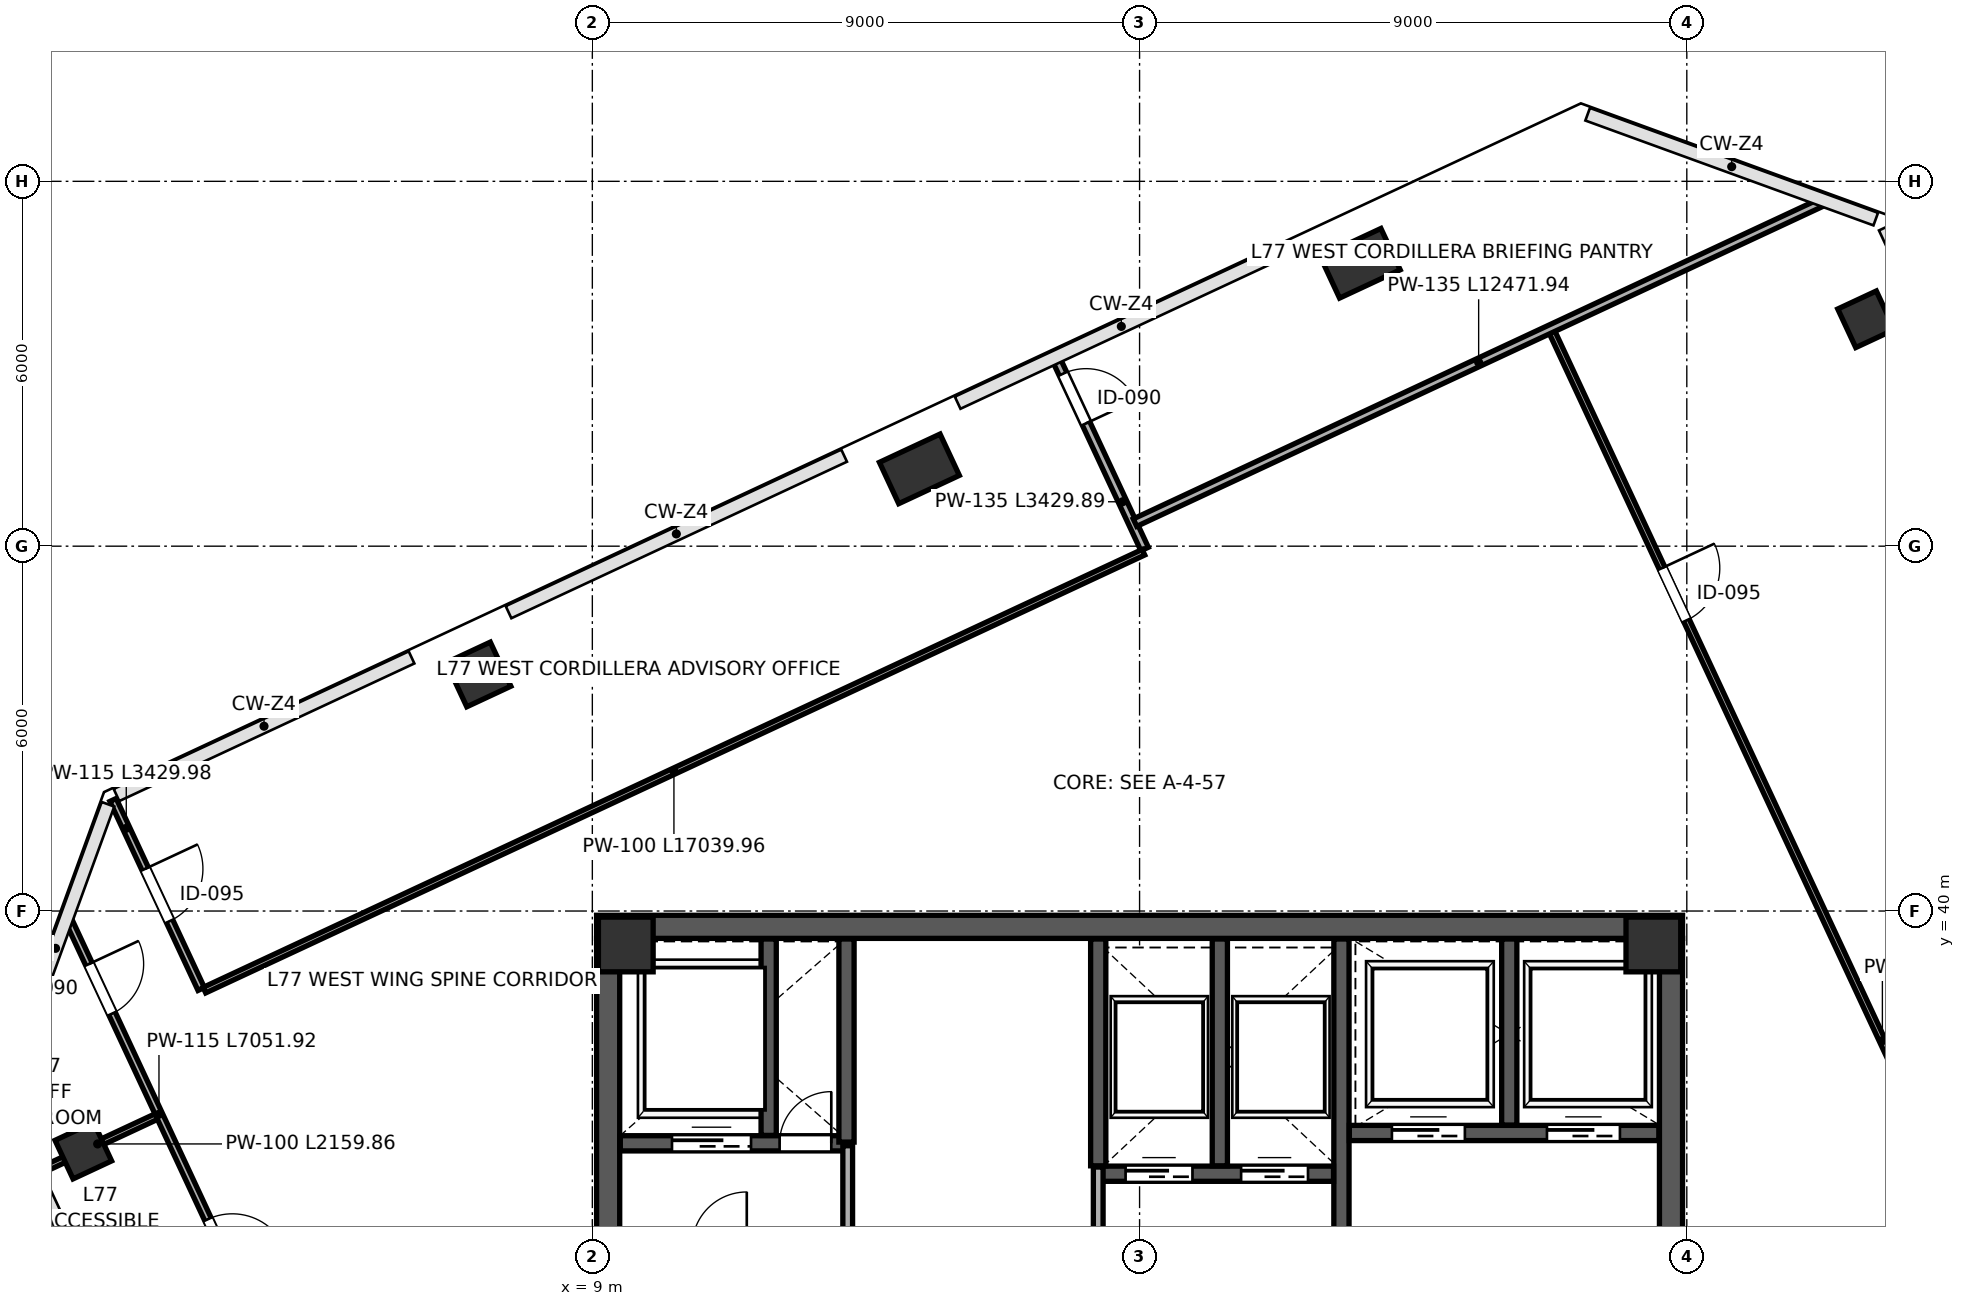
"""IFC4 building model, lengths in metres.
Left out: names, types, materials, properties, quantities, classifications, styles, units other than length and angle.
Written with IfcOpenShell. Run it as: python <this file> out.ifc"""

import sys

from ifc_helpers import new_model, si_unit, direction, frame, frame_2d, origin, origin_2d, place, context, subcontext, project, spatial, rectangle, extrude, source, transform, mapped, element, fill, save


model = new_model("IFC4")
c1 = context("Model", 3, precision=1e-05, world=origin(), true_north=direction((0.0, 1.0)))
c2 = subcontext(c1, "Body", "Model", "MODEL_VIEW")
j1 = project(units=[si_unit("LENGTHUNIT", "METRE"), si_unit("PLANEANGLEUNIT", "RADIAN")], contexts=[c1])
p1 = place(None, origin())
s1 = spatial("IfcSite", under=j1, at=p1, CompositionType="ELEMENT")
p2 = place(p1, origin())
s2 = spatial("IfcBuilding", under=s1, at=p2, CompositionType="ELEMENT")
p3 = place(p2, frame((0.0, 0.0, 340.8)))
s3 = spatial("IfcBuildingStorey", under=s2, at=p3, CompositionType="ELEMENT", Elevation=340.8)
m1 = source(origin(), c2, "Body", "SweptSolid", [
    extrude(rectangle(XDim=0.9, YDim=0.9, at=origin_2d()), origin(), (0.0, 0.0, 1.0), 4.198),
])
for number, where, z_axis, x_axis in (
    (1, (9.55, 39.45, 0.001), (0.0, 0.0, 1.0), (1.0, 0.0, 0.0)),
    (2, (26.45, 39.45, 0.001), (0.0, 0.0, 1.0), (1.0, 0.0, 0.0)),
):
    element("IfcColumn", number, at=place(p3, frame(where, z_axis=z_axis, x_axis=x_axis)), inside=s3, PredefinedType="COLUMN", context=c2, shape_type="MappedRepresentation", body=[
        mapped(m1, transform((0.0, 0.0, 0.0), scale=1.0)),
    ])
m2 = source(origin(), c2, "Body", "SweptSolid", [
    extrude(rectangle(XDim=0.7, YDim=0.7, at=origin_2d()), origin(), (0.0, 0.0, 1.0), 4.198),
])
for number, where, z_axis, x_axis in (
    (3, (0.629, 36.06, 0.001), (0.0, 0.0, 1.0), (-0.423, 0.906, 0.0)),
    (4, (29.948, 49.731, 0.001), (0.0, 0.0, 1.0), (-0.423, 0.906, 0.0)),
):
    element("IfcColumn", number, at=place(p3, frame(where, z_axis=z_axis, x_axis=x_axis)), inside=s3, PredefinedType="COLUMN", context=c2, shape_type="MappedRepresentation", body=[
        mapped(m2, transform((0.0, 0.0, 0.0), scale=1.0)),
    ])
m3 = source(origin(), c2, "Body", "SweptSolid", [
    extrude(rectangle(XDim=0.8, YDim=0.8, at=origin_2d()), origin(), (0.0, 0.0, 1.0), 4.198),
])
p4 = place(p3, frame((7.128, 43.89, 0.001), z_axis=(0.0, 0.0, 1.0), x_axis=(-0.422618261741, 0.906307787037, 0.0)))
e5 = element("IfcColumn", 5, at=p4, inside=s3, PredefinedType="COLUMN", context=c2, shape_type="MappedRepresentation", body=[
    mapped(m3, transform((0.0, 0.0, 0.0), scale=1.0)),
])
m4 = source(origin(), c2, "Body", "SweptSolid", [
    extrude(rectangle(XDim=0.75, YDim=1.1, at=origin_2d()), origin(), (0.0, 0.0, 1.0), 4.198),
])
for number, where, z_axis, x_axis in (
    (6, (14.379, 47.271, 0.001), (0.0, 0.0, 1.0), (-0.423, 0.906, 0.0)),
    (7, (21.629, 50.652, 0.001), (0.0, 0.0, 1.0), (-0.423, 0.906, 0.0)),
):
    element("IfcColumn", number, at=place(p3, frame(where, z_axis=z_axis, x_axis=x_axis)), inside=s3, PredefinedType="PILASTER", context=c2, shape_type="MappedRepresentation", body=[
        mapped(m4, transform((0.0, 0.0, 0.0), scale=1.0)),
    ])
p5 = place(p3, frame((9.26, 24.45, 0.0), z_axis=(0.0, 0.0, 1.0), x_axis=(0.0, 1.0, 0.0)))
e8 = element("IfcWall", 8, at=p5, inside=s3, PredefinedType="SHEAR", context=c2, shape_type="SweptSolid", body=[
    extrude(rectangle(XDim=15.1, YDim=0.38, at=frame_2d((7.55, 0.0))), origin(), (0.0, 0.0, 1.0), 3.96),
])
p6 = place(p5, frame((8.7, 0.0, 0.0)))
e9 = element("IfcOpeningElement", 9, at=p6, cuts=e8, PredefinedType="OPENING", context=c2, shape_type="SweptSolid", body=[
    extrude(rectangle(XDim=1.15, YDim=2.2, at=frame_2d((0.575, 1.1))), frame((0.0, 0.2, 0.0), z_axis=(0.0, -1.0, 0.0), x_axis=(1.0, 0.0, 0.0)), (0.0, 0.0, 1.0), 0.4),
])
p7 = place(p3, frame((26.74, 24.45, 0.0), z_axis=(0.0, 0.0, 1.0), x_axis=(0.0, 1.0, 0.0)))
e10 = element("IfcWall", 10, at=p7, inside=s3, PredefinedType="SHEAR", context=c2, shape_type="SweptSolid", body=[
    extrude(rectangle(XDim=15.1, YDim=0.38, at=frame_2d((7.55, 0.0))), origin(), (0.0, 0.0, 1.0), 3.96),
])
p8 = place(p7, frame((8.6, 0.0, 0.0)))
e11 = element("IfcOpeningElement", 11, at=p8, cuts=e10, PredefinedType="OPENING", context=c2, shape_type="SweptSolid", body=[
    extrude(rectangle(XDim=1.15, YDim=2.2, at=frame_2d((0.575, 1.1))), frame((0.0, 0.2, 0.0), z_axis=(0.0, -1.0, 0.0), x_axis=(1.0, 0.0, 0.0)), (0.0, 0.0, 1.0), 0.4),
])
p9 = place(p3, frame((9.07, 39.74, 0.0), z_axis=(0.0, 0.0, 1.0), x_axis=(1.0, 0.0, 0.0)))
e12 = element("IfcWall", 12, at=p9, inside=s3, PredefinedType="SHEAR", context=c2, shape_type="SweptSolid", body=[
    extrude(rectangle(XDim=17.86, YDim=0.38, at=frame_2d((8.93, 0.0))), origin(), (0.0, 0.0, 1.0), 3.96),
])
p10 = place(p3, frame((21.32, 32.12, 0.0), z_axis=(0.0, 0.0, 1.0), x_axis=(0.0, 1.0, 0.0)))
e13 = element("IfcWall", 13, at=p10, inside=s3, PredefinedType="SHEAR", context=c2, shape_type="SweptSolid", body=[
    extrude(rectangle(XDim=7.42, YDim=0.25, at=frame_2d((3.71, 0.0))), origin(), (0.0, 0.0, 1.0), 3.96),
])
p11 = place(p10, frame((1.4, 0.0, 0.0)))
e14 = element("IfcOpeningElement", 14, at=p11, cuts=e13, PredefinedType="OPENING", context=c2, shape_type="SweptSolid", body=[
    extrude(rectangle(XDim=1.15, YDim=2.2, at=frame_2d((0.575, 1.1))), frame((0.0, 0.135, 0.0), z_axis=(0.0, -1.0, 0.0), x_axis=(1.0, 0.0, 0.0)), (0.0, 0.0, 1.0), 0.27),
])
p12 = place(p3, frame((9.46, 36.18, 0.0), z_axis=(0.0, 0.0, 1.0), x_axis=(1.0, 0.0, 0.0)))
e15 = element("IfcWall", 15, at=p12, inside=s3, PredefinedType="SHEAR", context=c2, shape_type="SweptSolid", body=[
    extrude(rectangle(XDim=3.79, YDim=0.25, at=frame_2d((1.895, 0.0))), origin(), (0.0, 0.0, 1.0), 3.96),
])
p13 = place(p12, frame((2.62, 0.0, 0.0)))
e16 = element("IfcOpeningElement", 16, at=p13, cuts=e15, PredefinedType="OPENING", context=c2, shape_type="SweptSolid", body=[
    extrude(rectangle(XDim=0.85, YDim=2.1, at=frame_2d((0.425, 1.05))), frame((0.0, 0.135, 0.0), z_axis=(0.0, -1.0, 0.0), x_axis=(1.0, 0.0, 0.0)), (0.0, 0.0, 1.0), 0.27),
])
p14 = place(p12, frame((0.85, 0.0, 0.0)))
e17 = element("IfcOpeningElement", 17, at=p14, cuts=e15, PredefinedType="OPENING", context=c2, shape_type="SweptSolid", body=[
    extrude(rectangle(XDim=1.3, YDim=2.25, at=frame_2d((0.65, 1.125))), frame((0.0, 0.135, 0.0), z_axis=(0.0, -1.0, 0.0), x_axis=(1.0, 0.0, 0.0)), (0.0, 0.0, 1.0), 0.27),
])
p15 = place(p3, frame((11.9, 36.31, 0.0), z_axis=(0.0, 0.0, 1.0), x_axis=(0.0, 1.0, 0.0)))
e18 = element("IfcWall", 18, at=p15, inside=s3, PredefinedType="SHEAR", context=c2, shape_type="SweptSolid", body=[
    extrude(rectangle(XDim=3.23, YDim=0.25, at=frame_2d((1.615, 0.0))), origin(), (0.0, 0.0, 1.0), 3.96),
])
p16 = place(p3, frame((21.45, 36.35, 0.0), z_axis=(0.0, 0.0, 1.0), x_axis=(1.0, 0.0, 0.0)))
e19 = element("IfcWall", 19, at=p16, inside=s3, PredefinedType="SHEAR", context=c2, shape_type="SweptSolid", body=[
    extrude(rectangle(XDim=5.09, YDim=0.25, at=frame_2d((2.545, 0.0))), origin(), (0.0, 0.0, 1.0), 3.96),
])
p17 = place(p16, frame((0.7, 0.0, 0.0)))
e20 = element("IfcOpeningElement", 20, at=p17, cuts=e19, PredefinedType="OPENING", context=c2, shape_type="SweptSolid", body=[
    extrude(rectangle(XDim=1.2, YDim=2.2, at=frame_2d((0.6, 1.1))), frame((0.0, 0.135, 0.0), z_axis=(0.0, -1.0, 0.0), x_axis=(1.0, 0.0, 0.0)), (0.0, 0.0, 1.0), 0.27),
])
p18 = place(p16, frame((3.25, 0.0, 0.0)))
e21 = element("IfcOpeningElement", 21, at=p18, cuts=e19, PredefinedType="OPENING", context=c2, shape_type="SweptSolid", body=[
    extrude(rectangle(XDim=1.2, YDim=2.2, at=frame_2d((0.6, 1.1))), frame((0.0, 0.135, 0.0), z_axis=(0.0, -1.0, 0.0), x_axis=(1.0, 0.0, 0.0)), (0.0, 0.0, 1.0), 0.27),
])
p19 = place(p3, frame((24.08, 36.48, 0.0), z_axis=(0.0, 0.0, 1.0), x_axis=(0.0, 1.0, 0.0)))
e22 = element("IfcWall", 22, at=p19, inside=s3, PredefinedType="SHEAR", context=c2, shape_type="SweptSolid", body=[
    extrude(rectangle(XDim=3.06, YDim=0.25, at=frame_2d((1.53, 0.0))), origin(), (0.0, 0.0, 1.0), 3.96),
])
p20 = place(p3, frame((13.18, 36.2, 0.0), z_axis=(0.0, 0.0, 1.0), x_axis=(0.0, 1.0, 0.0)))
e23 = element("IfcWall", 23, at=p20, inside=s3, PredefinedType="SHEAR", context=c2, shape_type="SweptSolid", body=[
    extrude(rectangle(XDim=3.34, YDim=0.25, at=frame_2d((1.67, 0.0))), origin(), (0.0, 0.0, 1.0), 3.96),
])
p21 = place(p3, frame((17.32, 35.68, 0.0), z_axis=(0.0, 0.0, 1.0), x_axis=(1.0, 0.0, 0.0)))
e24 = element("IfcWall", 24, at=p21, inside=s3, PredefinedType="SHEAR", context=c2, shape_type="SweptSolid", body=[
    extrude(rectangle(XDim=3.87, YDim=0.25, at=frame_2d((1.935, 0.0))), origin(), (0.0, 0.0, 1.0), 3.96),
])
p22 = place(p21, frame((0.45, 0.0, 0.0)))
e25 = element("IfcOpeningElement", 25, at=p22, cuts=e24, PredefinedType="OPENING", context=c2, shape_type="SweptSolid", body=[
    extrude(rectangle(XDim=1.1, YDim=2.2, at=frame_2d((0.55, 1.1))), frame((0.0, 0.135, 0.0), z_axis=(0.0, -1.0, 0.0), x_axis=(1.0, 0.0, 0.0)), (0.0, 0.0, 1.0), 0.27),
])
p23 = place(p21, frame((2.35, 0.0, 0.0)))
e26 = element("IfcOpeningElement", 26, at=p23, cuts=e24, PredefinedType="OPENING", context=c2, shape_type="SweptSolid", body=[
    extrude(rectangle(XDim=1.1, YDim=2.2, at=frame_2d((0.55, 1.1))), frame((0.0, 0.135, 0.0), z_axis=(0.0, -1.0, 0.0), x_axis=(1.0, 0.0, 0.0)), (0.0, 0.0, 1.0), 0.27),
])
for number, where, z_axis, x_axis in (
    (27, (17.32, 35.81, 0.0), (0.0, 0.0, 1.0), (0.0, 1.0, 0.0)),
    (28, (19.32, 35.81, 0.0), (0.0, 0.0, 1.0), (0.0, 1.0, 0.0)),
):
    element("IfcWall", number, at=place(p3, frame(where, z_axis=z_axis, x_axis=x_axis)), inside=s3, PredefinedType="SHEAR", context=c2, shape_type="SweptSolid", body=[
        extrude(rectangle(XDim=3.73, YDim=0.25, at=frame_2d((1.865, 0.0))), origin(), (0.0, 0.0, 1.0), 3.96),
    ])
p24 = place(p3, frame((13.2, 34.57, 0.0), z_axis=(0.0, 0.0, 1.0), x_axis=(0.0, 1.0, 0.0)))
e29 = element("IfcWall", 29, at=p24, inside=s3, PredefinedType="PARTITIONING", context=c2, shape_type="SweptSolid", body=[
    extrude(rectangle(XDim=1.57, YDim=0.16, at=frame_2d((0.785, 0.0))), origin(), (0.0, 0.0, 1.0), 3.96),
])
p25 = place(p3, frame((17.32, 33.86, 0.0), z_axis=(0.0, 0.0, 1.0), x_axis=(0.0, 1.0, 0.0)))
e30 = element("IfcWall", 30, at=p25, inside=s3, PredefinedType="PARTITIONING", context=c2, shape_type="SweptSolid", body=[
    extrude(rectangle(XDim=1.93, YDim=0.16, at=frame_2d((0.965, 0.0))), origin(), (0.0, 0.0, 1.0), 3.96),
])
p26 = place(p3, frame((-0.114, 35.713, 0.0), z_axis=(0.0, 0.0, 1.0), x_axis=(0.906301500739, 0.422631742487, 0.0)))
e31 = element("IfcWall", 31, at=p26, inside=s3, PredefinedType="PARTITIONING", context=c2, shape_type="SweptSolid", body=[
    extrude(rectangle(XDim=2.16, YDim=0.1, at=frame_2d((1.08, 0.0))), origin(), (0.0, 0.0, 1.0), 3.295),
])
p27 = place(p3, frame((0.383, 39.853, 0.0), z_axis=(0.0, 0.0, 1.0), x_axis=(0.422618208415, -0.906307811903, 0.0)))
e32 = element("IfcWall", 32, at=p27, inside=s3, PredefinedType="PARTITIONING", context=c2, shape_type="SweptSolid", body=[
    extrude(rectangle(XDim=7.052, YDim=0.115, at=frame_2d((3.526, 0.0))), origin(), (0.0, 0.0, 1.0), 3.96),
])
p28 = place(p27, frame((0.8, 0.0, 0.0)))
e33 = element("IfcOpeningElement", 33, at=p28, cuts=e32, PredefinedType="OPENING", context=c2, shape_type="SweptSolid", body=[
    extrude(rectangle(XDim=0.9, YDim=2.15, at=frame_2d((0.45, 1.075))), frame((0.0, 0.067, 0.0), z_axis=(0.0, -1.0, 0.0), x_axis=(1.0, 0.0, 0.0)), (0.0, 0.0, 1.0), 0.135),
])
p29 = place(p27, frame((5.43, 0.0, 0.0)))
e34 = element("IfcOpeningElement", 34, at=p29, cuts=e32, PredefinedType="OPENING", context=c2, shape_type="SweptSolid", body=[
    extrude(rectangle(XDim=0.95, YDim=2.15, at=frame_2d((0.475, 1.075))), frame((0.0, 0.067, 0.0), z_axis=(0.0, -1.0, 0.0), x_axis=(1.0, 0.0, 0.0)), (0.0, 0.0, 1.0), 0.135),
])
p30 = place(p3, frame((24.775, 49.537, 0.0), z_axis=(0.0, 0.0, 1.0), x_axis=(0.422615543458, -0.906309054588, 0.0)))
e35 = element("IfcWall", 35, at=p30, inside=s3, PredefinedType="PARTITIONING", context=c2, shape_type="SweptSolid", body=[
    extrude(rectangle(XDim=25.75, YDim=0.1, at=frame_2d((12.875, 0.0))), origin(), (0.0, 0.0, 1.0), 3.96),
])
p31 = place(p30, frame((4.3, 0.0, 0.0)))
e36 = element("IfcOpeningElement", 36, at=p31, cuts=e35, PredefinedType="OPENING", context=c2, shape_type="SweptSolid", body=[
    extrude(rectangle(XDim=0.95, YDim=2.15, at=frame_2d((0.475, 1.075))), frame((0.0, 0.06, 0.0), z_axis=(0.0, -1.0, 0.0), x_axis=(1.0, 0.0, 0.0)), (0.0, 0.0, 1.0), 0.12),
])
p32 = place(p3, frame((16.633, 49.062, 0.0), z_axis=(0.0, 0.0, 1.0), x_axis=(0.422675027226, -0.906281314692, 0.0)))
e37 = element("IfcWall", 37, at=p32, inside=s3, PredefinedType="PARTITIONING", context=c2, shape_type="SweptSolid", body=[
    extrude(rectangle(XDim=3.43, YDim=0.135, at=frame_2d((1.715, 0.0))), origin(), (0.0, 0.0, 1.0), 3.295),
])
p33 = place(p32, frame((0.25, 0.0, 0.0)))
e38 = element("IfcOpeningElement", 38, at=p33, cuts=e37, PredefinedType="OPENING", context=c2, shape_type="SweptSolid", body=[
    extrude(rectangle(XDim=0.9, YDim=2.15, at=frame_2d((0.45, 1.075))), frame((0.0, 0.078, 0.0), z_axis=(0.0, -1.0, 0.0), x_axis=(1.0, 0.0, 0.0)), (0.0, 0.0, 1.0), 0.155),
])
p34 = place(p3, frame((1.117, 41.827, 0.0), z_axis=(0.0, 0.0, 1.0), x_axis=(0.422589296843, -0.906321293027, 0.0)))
e39 = element("IfcWall", 39, at=p34, inside=s3, PredefinedType="PARTITIONING", context=c2, shape_type="SweptSolid", body=[
    extrude(rectangle(XDim=3.43, YDim=0.115, at=frame_2d((1.715, 0.0))), origin(), (0.0, 0.0, 1.0), 3.96),
])
p35 = place(p34, frame((1.25, 0.0, 0.0)))
e40 = element("IfcOpeningElement", 40, at=p35, cuts=e39, PredefinedType="OPENING", context=c2, shape_type="SweptSolid", body=[
    extrude(rectangle(XDim=0.95, YDim=2.15, at=frame_2d((0.475, 1.075))), frame((0.0, 0.067, 0.0), z_axis=(0.0, -1.0, 0.0), x_axis=(1.0, 0.0, 0.0)), (0.0, 0.0, 1.0), 0.135),
])
p36 = place(p3, frame((2.62, 38.698, 0.0), z_axis=(0.0, 0.0, 1.0), x_axis=(0.90630352598, 0.422627399487, 0.0)))
e41 = element("IfcWall", 41, at=p36, inside=s3, PredefinedType="PARTITIONING", context=c2, shape_type="SweptSolid", body=[
    extrude(rectangle(XDim=17.04, YDim=0.1, at=frame_2d((8.52, 0.0))), origin(), (0.0, 0.0, 1.0), 3.96),
])
p37 = place(p3, frame((17.925, 46.387, 0.0), z_axis=(0.0, 0.0, 1.0), x_axis=(0.906304624979, 0.422625042729, 0.0)))
e42 = element("IfcWall", 42, at=p37, inside=s3, PredefinedType="PARTITIONING", context=c2, shape_type="SweptSolid", body=[
    extrude(rectangle(XDim=12.472, YDim=0.135, at=frame_2d((6.236, 0.0))), origin(), (0.0, 0.0, 1.0), 3.96),
])
m5 = source(origin(), c2, "Body", "SweptSolid", [
    extrude(rectangle(XDim=0.85, YDim=2.1, at=frame_2d((0.425, 1.05))), frame((0.0, 0.025, 0.0), z_axis=(0.0, -1.0, 0.0), x_axis=(1.0, 0.0, 0.0)), (0.0, 0.0, 1.0), 0.05),
])
p38 = place(p13, origin())
e43 = element("IfcDoor", 43, at=p38, inside=s3, OperationType="SINGLE_SWING_RIGHT", PredefinedType="DOOR", context=c2, shape_type="MappedRepresentation", body=[
    mapped(m5, transform((0.0, 0.0, 0.0), scale=1.0)),
])
fill(e16, e43)
m6 = source(origin(), c2, "Body", "SweptSolid", [
    extrude(rectangle(XDim=1.1, YDim=2.2, at=frame_2d((0.55, 1.1))), frame((0.0, 0.025, 0.0), z_axis=(0.0, -1.0, 0.0), x_axis=(1.0, 0.0, 0.0)), (0.0, 0.0, 1.0), 0.05),
])
p39 = place(p22, origin())
e44 = element("IfcDoor", 44, at=p39, inside=s3, OperationType="SLIDING_TO_LEFT", PredefinedType="DOOR", context=c2, shape_type="MappedRepresentation", body=[
    mapped(m6, transform((0.0, 0.0, 0.0), scale=1.0)),
])
fill(e25, e44)
p40 = place(p23, origin())
e45 = element("IfcDoor", 45, at=p40, inside=s3, OperationType="SLIDING_TO_RIGHT", PredefinedType="DOOR", context=c2, shape_type="MappedRepresentation", body=[
    mapped(m6, transform((0.0, 0.0, 0.0), scale=1.0)),
])
fill(e26, e45)
m7 = source(origin(), c2, "Body", "SweptSolid", [
    extrude(rectangle(XDim=1.2, YDim=2.2, at=frame_2d((0.6, 1.1))), frame((0.0, 0.025, 0.0), z_axis=(0.0, -1.0, 0.0), x_axis=(1.0, 0.0, 0.0)), (0.0, 0.0, 1.0), 0.05),
])
p41 = place(p17, origin())
e46 = element("IfcDoor", 46, at=p41, inside=s3, OperationType="SLIDING_TO_LEFT", PredefinedType="DOOR", context=c2, shape_type="MappedRepresentation", body=[
    mapped(m7, transform((0.0, 0.0, 0.0), scale=1.0)),
])
fill(e20, e46)
p42 = place(p18, origin())
e47 = element("IfcDoor", 47, at=p42, inside=s3, OperationType="SLIDING_TO_RIGHT", PredefinedType="DOOR", context=c2, shape_type="MappedRepresentation", body=[
    mapped(m7, transform((0.0, 0.0, 0.0), scale=1.0)),
])
fill(e21, e47)
m8 = source(origin(), c2, "Body", "SweptSolid", [
    extrude(rectangle(XDim=1.3, YDim=2.25, at=frame_2d((0.65, 1.125))), frame((0.0, 0.025, 0.0), z_axis=(0.0, -1.0, 0.0), x_axis=(1.0, 0.0, 0.0)), (0.0, 0.0, 1.0), 0.05),
])
p43 = place(p14, origin())
e48 = element("IfcDoor", 48, at=p43, inside=s3, OperationType="SLIDING_TO_LEFT", PredefinedType="DOOR", context=c2, shape_type="MappedRepresentation", body=[
    mapped(m8, transform((0.0, 0.0, 0.0), scale=1.0)),
])
fill(e17, e48)
m9 = source(origin(), c2, "Body", "SweptSolid", [
    extrude(rectangle(XDim=0.9, YDim=2.15, at=frame_2d((0.45, 1.075))), frame((0.0, 0.025, 0.0), z_axis=(0.0, -1.0, 0.0), x_axis=(1.0, 0.0, 0.0)), (0.0, 0.0, 1.0), 0.05),
])
p44 = place(p28, origin())
e49 = element("IfcDoor", 49, at=p44, inside=s3, OperationType="SINGLE_SWING_LEFT", PredefinedType="DOOR", context=c2, shape_type="MappedRepresentation", body=[
    mapped(m9, transform((0.0, 0.0, 0.0), scale=1.0)),
])
fill(e33, e49)
m10 = source(origin(), c2, "Body", "SweptSolid", [
    extrude(rectangle(XDim=0.95, YDim=2.15, at=frame_2d((0.475, 1.075))), frame((0.0, 0.025, 0.0), z_axis=(0.0, -1.0, 0.0), x_axis=(1.0, 0.0, 0.0)), (0.0, 0.0, 1.0), 0.05),
])
p45 = place(p29, origin())
e50 = element("IfcDoor", 50, at=p45, inside=s3, OperationType="SINGLE_SWING_RIGHT", PredefinedType="DOOR", context=c2, shape_type="MappedRepresentation", body=[
    mapped(m10, transform((0.0, 0.0, 0.0), scale=1.0)),
])
fill(e34, e50)
p46 = place(p31, origin())
e51 = element("IfcDoor", 51, at=p46, inside=s3, OperationType="SINGLE_SWING_LEFT", PredefinedType="DOOR", context=c2, shape_type="MappedRepresentation", body=[
    mapped(m10, transform((0.0, 0.0, 0.0), scale=1.0)),
])
fill(e36, e51)
p47 = place(p35, origin())
e52 = element("IfcDoor", 52, at=p47, inside=s3, OperationType="SINGLE_SWING_LEFT", PredefinedType="DOOR", context=c2, shape_type="MappedRepresentation", body=[
    mapped(m10, transform((0.0, 0.0, 0.0), scale=1.0)),
])
fill(e40, e52)
p48 = place(p33, origin())
e53 = element("IfcDoor", 53, at=p48, inside=s3, OperationType="SINGLE_SWING_RIGHT", PredefinedType="DOOR", context=c2, shape_type="MappedRepresentation", body=[
    mapped(m9, transform((0.0, 0.0, 0.0), scale=1.0)),
])
fill(e38, e53)
save(model, sys.argv[1])
